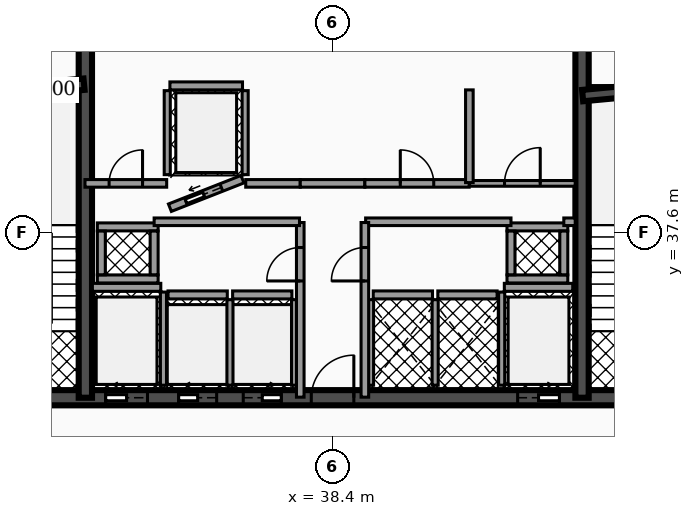
"""IFC4 building model, lengths in metres.
Left out: names, types, materials, properties, quantities, classifications, styles, units other than length and angle.
Written with IfcOpenShell. Run it as: python <this file> out.ifc"""

import sys

from ifc_helpers import new_model, si_unit, direction, frame, frame_2d, origin, place, context, subcontext, project, spatial, rectangle, extrude, element, fill, save


model = new_model("IFC4")
c1 = context("Model", 3, precision=1e-05, world=origin(), true_north=direction((0.0, 1.0)))
c2 = subcontext(c1, "Body", "Model", "MODEL_VIEW")
j1 = project(units=[si_unit("LENGTHUNIT", "METRE"), si_unit("PLANEANGLEUNIT", "RADIAN")], contexts=[c1])
p1 = place(None, origin())
s1 = spatial("IfcSite", under=j1, at=p1, CompositionType="ELEMENT")
p2 = place(p1, origin())
s2 = spatial("IfcBuilding", under=s1, at=p2, CompositionType="ELEMENT")
p3 = place(p2, frame((0.0, 0.0, 142.12)))
s3 = spatial("IfcBuildingStorey", under=s2, at=p3, CompositionType="ELEMENT", Elevation=142.12)
p4 = place(p3, frame((28.4, 33.25, 0.0), z_axis=(0.0, 0.0, 1.0), x_axis=(1.0, 0.0, 0.0)))
e1 = element("IfcWall", 1, at=p4, inside=s3, PredefinedType="SHEAR", context=c2, shape_type="SweptSolid", body=[
    extrude(rectangle(XDim=20.06, YDim=0.4, at=frame_2d((10.03, 0.0))), origin(), (0.0, 0.0, 1.0), 3.5),
])
p5 = place(p4, frame((4.03, 0.0, 0.0)))
e2 = element("IfcOpeningElement", 2, at=p5, cuts=e1, PredefinedType="OPENING", context=c2, shape_type="SweptSolid", body=[
    extrude(rectangle(XDim=1.1, YDim=2.15, at=frame_2d((0.55, 1.075))), frame((0.0, 0.21, 0.0), z_axis=(0.0, -1.0, 0.0), x_axis=(1.0, 0.0, 0.0)), (0.0, 0.0, 1.0), 0.42),
])
p6 = place(p4, frame((14.87, 0.0, 0.0)))
e3 = element("IfcOpeningElement", 3, at=p6, cuts=e1, PredefinedType="OPENING", context=c2, shape_type="SweptSolid", body=[
    extrude(rectangle(XDim=1.1, YDim=2.15, at=frame_2d((0.55, 1.075))), frame((0.0, 0.21, 0.0), z_axis=(0.0, -1.0, 0.0), x_axis=(1.0, 0.0, 0.0)), (0.0, 0.0, 1.0), 0.42),
])
p7 = place(p4, frame((5.95, 0.0, 0.0)))
e4 = element("IfcOpeningElement", 4, at=p7, cuts=e1, PredefinedType="OPENING", context=c2, shape_type="SweptSolid", body=[
    extrude(rectangle(XDim=1.0, YDim=2.1, at=frame_2d((0.5, 1.05))), frame((0.0, 0.21, 0.0), z_axis=(0.0, -1.0, 0.0), x_axis=(1.0, 0.0, 0.0)), (0.0, 0.0, 1.0), 0.42),
])
p8 = place(p4, frame((7.65, 0.0, 0.0)))
e5 = element("IfcOpeningElement", 5, at=p8, cuts=e1, PredefinedType="OPENING", context=c2, shape_type="SweptSolid", body=[
    extrude(rectangle(XDim=1.0, YDim=2.1, at=frame_2d((0.5, 1.05))), frame((0.0, 0.21, 0.0), z_axis=(0.0, -1.0, 0.0), x_axis=(1.0, 0.0, 0.0)), (0.0, 0.0, 1.0), 0.42),
])
p9 = place(p4, frame((1.31, 0.0, 0.0)))
e6 = element("IfcOpeningElement", 6, at=p9, cuts=e1, PredefinedType="OPENING", context=c2, shape_type="SweptSolid", body=[
    extrude(rectangle(XDim=1.1, YDim=2.2, at=frame_2d((0.55, 1.1))), frame((0.0, 0.21, 0.0), z_axis=(0.0, -1.0, 0.0), x_axis=(1.0, 0.0, 0.0)), (0.0, 0.0, 1.0), 0.42),
])
p10 = place(p4, frame((9.44, 0.0, 0.0)))
e7 = element("IfcOpeningElement", 7, at=p10, cuts=e1, PredefinedType="OPENING", context=c2, shape_type="SweptSolid", body=[
    extrude(rectangle(XDim=1.12, YDim=2.05, at=frame_2d((0.56, 1.025))), frame((0.0, 0.21, 0.0), z_axis=(0.0, -1.0, 0.0), x_axis=(1.0, 0.0, 0.0)), (0.0, 0.0, 1.0), 0.42),
])
p11 = place(p4, frame((17.65, 0.0, 0.0)))
e8 = element("IfcOpeningElement", 8, at=p11, cuts=e1, PredefinedType="OPENING", context=c2, shape_type="SweptSolid", body=[
    extrude(rectangle(XDim=1.1, YDim=2.2, at=frame_2d((0.55, 1.1))), frame((0.0, 0.21, 0.0), z_axis=(0.0, -1.0, 0.0), x_axis=(1.0, 0.0, 0.0)), (0.0, 0.0, 1.0), 0.42),
])
for number, where, z_axis, x_axis in (
    (9, (31.895, 33.25, 0.0), (0.0, 0.0, 1.0), (0.0, 1.0, 0.0)),
    (10, (44.965, 33.25, 0.0), (0.0, 0.0, 1.0), (0.0, 1.0, 0.0)),
):
    element("IfcWall", number, at=place(p3, frame(where, z_axis=z_axis, x_axis=x_axis)), inside=s3, PredefinedType="SHEAR", context=c2, shape_type="SweptSolid", body=[
        extrude(rectangle(XDim=10.2, YDim=0.35, at=frame_2d((5.1, 0.0))), origin(), (0.0, 0.0, 1.0), 3.5),
    ])
p12 = place(p3, frame((28.64, 41.2, 0.0), z_axis=(0.0, 0.0, 1.0), x_axis=(0.995687118776, 0.092774789157, 0.0)))
e11 = element("IfcWall", 11, at=p12, inside=s3, PredefinedType="SHEAR", context=c2, shape_type="SweptSolid", body=[
    extrude(rectangle(XDim=3.234, YDim=0.3, at=frame_2d((1.617, 0.0))), origin(), (0.0, 0.0, 1.0), 3.5),
])
p13 = place(p3, frame((44.98, 41.2, 0.0), z_axis=(0.0, 0.0, 1.0), x_axis=(0.995686468965, 0.09278176286, 0.0)))
e12 = element("IfcWall", 12, at=p13, inside=s3, PredefinedType="SHEAR", context=c2, shape_type="SweptSolid", body=[
    extrude(rectangle(XDim=3.234, YDim=0.3, at=frame_2d((1.617, 0.0))), origin(), (0.0, 0.0, 1.0), 3.5),
])
p14 = place(p3, frame((32.08, 36.155, 0.0), z_axis=(0.0, 0.0, 1.0), x_axis=(1.0, 0.0, 0.0)))
e13 = element("IfcWall", 13, at=p14, inside=s3, PredefinedType="SOLIDWALL", context=c2, shape_type="SweptSolid", body=[
    extrude(rectangle(XDim=1.8, YDim=0.21, at=frame_2d((0.9, 0.0))), origin(), (0.0, 0.0, 1.0), 2.472),
])
p15 = place(p3, frame((33.95, 33.58, 0.0), z_axis=(0.0, 0.0, 1.0), x_axis=(0.0, 1.0, 0.0)))
e14 = element("IfcWall", 14, at=p15, inside=s3, PredefinedType="SOLIDWALL", context=c2, shape_type="SweptSolid", body=[
    extrude(rectangle(XDim=2.45, YDim=0.16, at=frame_2d((1.225, 0.0))), origin(), (0.0, 0.0, 1.0), 2.472),
])
p16 = place(p3, frame((42.92, 36.155, 0.0), z_axis=(0.0, 0.0, 1.0), x_axis=(1.0, 0.0, 0.0)))
e15 = element("IfcWall", 15, at=p16, inside=s3, PredefinedType="SOLIDWALL", context=c2, shape_type="SweptSolid", body=[
    extrude(rectangle(XDim=1.8, YDim=0.21, at=frame_2d((0.9, 0.0))), origin(), (0.0, 0.0, 1.0), 2.472),
])
p17 = place(p3, frame((42.85, 33.58, 0.0), z_axis=(0.0, 0.0, 1.0), x_axis=(0.0, 1.0, 0.0)))
e16 = element("IfcWall", 16, at=p17, inside=s3, PredefinedType="SOLIDWALL", context=c2, shape_type="SweptSolid", body=[
    extrude(rectangle(XDim=2.45, YDim=0.16, at=frame_2d((1.225, 0.0))), origin(), (0.0, 0.0, 1.0), 2.472),
])
p18 = place(p3, frame((34.07, 35.955, 0.0), z_axis=(0.0, 0.0, 1.0), x_axis=(1.0, 0.0, 0.0)))
e17 = element("IfcWall", 17, at=p18, inside=s3, PredefinedType="SOLIDWALL", context=c2, shape_type="SweptSolid", body=[
    extrude(rectangle(XDim=1.56, YDim=0.21, at=frame_2d((0.78, 0.0))), origin(), (0.0, 0.0, 1.0), 2.472),
])
p19 = place(p3, frame((35.7, 33.58, 0.0), z_axis=(0.0, 0.0, 1.0), x_axis=(0.0, 1.0, 0.0)))
e18 = element("IfcWall", 18, at=p19, inside=s3, PredefinedType="SOLIDWALL", context=c2, shape_type="SweptSolid", body=[
    extrude(rectangle(XDim=2.25, YDim=0.16, at=frame_2d((1.125, 0.0))), origin(), (0.0, 0.0, 1.0), 2.472),
])
p20 = place(p3, frame((35.77, 35.955, 0.0), z_axis=(0.0, 0.0, 1.0), x_axis=(1.0, 0.0, 0.0)))
e19 = element("IfcWall", 19, at=p20, inside=s3, PredefinedType="SOLIDWALL", context=c2, shape_type="SweptSolid", body=[
    extrude(rectangle(XDim=1.56, YDim=0.21, at=frame_2d((0.78, 0.0))), origin(), (0.0, 0.0, 1.0), 2.472),
])
p21 = place(p3, frame((37.4, 33.58, 0.0), z_axis=(0.0, 0.0, 1.0), x_axis=(0.0, 1.0, 0.0)))
e20 = element("IfcWall", 20, at=p21, inside=s3, PredefinedType="SOLIDWALL", context=c2, shape_type="SweptSolid", body=[
    extrude(rectangle(XDim=2.25, YDim=0.16, at=frame_2d((1.125, 0.0))), origin(), (0.0, 0.0, 1.0), 2.472),
])
p22 = place(p3, frame((34.12, 38.25, 0.0), z_axis=(0.0, 0.0, 1.0), x_axis=(0.930804993012, 0.36551616241, 0.0)))
e21 = element("IfcWall", 21, at=p22, inside=s3, PredefinedType="SOLIDWALL", context=c2, shape_type="SweptSolid", body=[
    extrude(rectangle(XDim=2.052, YDim=0.21, at=frame_2d((1.026, 0.0))), origin(), (0.0, 0.0, 1.0), 2.472),
])
p23 = place(p22, frame((0.455, 0.0, 0.0)))
e22 = element("IfcOpeningElement", 22, at=p23, cuts=e21, PredefinedType="OPENING", context=c2, shape_type="SweptSolid", body=[
    extrude(rectangle(XDim=1.0, YDim=2.1, at=frame_2d((0.5, 1.05))), frame((0.0, 0.115, 0.0), z_axis=(0.0, -1.0, 0.0), x_axis=(1.0, 0.0, 0.0)), (0.0, 0.0, 1.0), 0.23),
])
p24 = place(p3, frame((34.12, 41.455, 0.0), z_axis=(0.0, 0.0, 1.0), x_axis=(1.0, 0.0, 0.0)))
e23 = element("IfcWall", 23, at=p24, inside=s3, PredefinedType="SOLIDWALL", context=c2, shape_type="SweptSolid", body=[
    extrude(rectangle(XDim=1.91, YDim=0.21, at=frame_2d((0.955, 0.0))), origin(), (0.0, 0.0, 1.0), 2.472),
])
for number, where, z_axis, x_axis in (
    (24, (34.05, 39.12, 0.0), (0.0, 0.0, 1.0), (0.0, 1.0, 0.0)),
    (25, (36.1, 39.12, 0.0), (0.0, 0.0, 1.0), (0.0, 1.0, 0.0)),
):
    element("IfcWall", number, at=place(p3, frame(where, z_axis=z_axis, x_axis=x_axis)), inside=s3, PredefinedType="SOLIDWALL", context=c2, shape_type="SweptSolid", body=[
        extrude(rectangle(XDim=2.21, YDim=0.16, at=frame_2d((1.105, 0.0))), origin(), (0.0, 0.0, 1.0), 2.472),
    ])
p25 = place(p3, frame((39.47, 35.955, 0.0), z_axis=(0.0, 0.0, 1.0), x_axis=(1.0, 0.0, 0.0)))
e26 = element("IfcWall", 26, at=p25, inside=s3, PredefinedType="SOLIDWALL", context=c2, shape_type="SweptSolid", body=[
    extrude(rectangle(XDim=1.56, YDim=0.21, at=frame_2d((0.78, 0.0))), origin(), (0.0, 0.0, 1.0), 2.472),
])
for number, where, z_axis, x_axis in (
    (27, (39.4, 33.58, 0.0), (0.0, 0.0, 1.0), (0.0, 1.0, 0.0)),
    (28, (41.1, 33.58, 0.0), (0.0, 0.0, 1.0), (0.0, 1.0, 0.0)),
):
    element("IfcWall", number, at=place(p3, frame(where, z_axis=z_axis, x_axis=x_axis)), inside=s3, PredefinedType="SOLIDWALL", context=c2, shape_type="SweptSolid", body=[
        extrude(rectangle(XDim=2.25, YDim=0.16, at=frame_2d((1.125, 0.0))), origin(), (0.0, 0.0, 1.0), 2.472),
    ])
p26 = place(p3, frame((41.17, 35.955, 0.0), z_axis=(0.0, 0.0, 1.0), x_axis=(1.0, 0.0, 0.0)))
e29 = element("IfcWall", 29, at=p26, inside=s3, PredefinedType="SOLIDWALL", context=c2, shape_type="SweptSolid", body=[
    extrude(rectangle(XDim=1.56, YDim=0.21, at=frame_2d((0.78, 0.0))), origin(), (0.0, 0.0, 1.0), 2.472),
])
for number, where, z_axis, x_axis in (
    (30, (32.21, 36.375, 0.0), (0.0, 0.0, 1.0), (1.0, 0.0, 0.0)),
    (31, (32.21, 37.745, 0.0), (0.0, 0.0, 1.0), (1.0, 0.0, 0.0)),
):
    element("IfcWall", number, at=place(p3, frame(where, z_axis=z_axis, x_axis=x_axis)), inside=s3, PredefinedType="SOLIDWALL", context=c2, shape_type="SweptSolid", body=[
        extrude(rectangle(XDim=1.6, YDim=0.21, at=frame_2d((0.8, 0.0))), origin(), (0.0, 0.0, 1.0), 3.5),
    ])
for number, where, z_axis, x_axis in (
    (32, (32.315, 36.485, 0.0), (0.0, 0.0, 1.0), (0.0, 1.0, 0.0)),
    (33, (33.705, 36.485, 0.0), (0.0, 0.0, 1.0), (0.0, 1.0, 0.0)),
):
    element("IfcWall", number, at=place(p3, frame(where, z_axis=z_axis, x_axis=x_axis)), inside=s3, PredefinedType="SOLIDWALL", context=c2, shape_type="SweptSolid", body=[
        extrude(rectangle(XDim=1.15, YDim=0.21, at=frame_2d((0.575, 0.0))), origin(), (0.0, 0.0, 1.0), 3.5),
    ])
for number, where, z_axis, x_axis in (
    (34, (42.99, 36.375, 0.0), (0.0, 0.0, 1.0), (1.0, 0.0, 0.0)),
    (35, (42.99, 37.745, 0.0), (0.0, 0.0, 1.0), (1.0, 0.0, 0.0)),
):
    element("IfcWall", number, at=place(p3, frame(where, z_axis=z_axis, x_axis=x_axis)), inside=s3, PredefinedType="SOLIDWALL", context=c2, shape_type="SweptSolid", body=[
        extrude(rectangle(XDim=1.6, YDim=0.21, at=frame_2d((0.8, 0.0))), origin(), (0.0, 0.0, 1.0), 3.5),
    ])
for number, where, z_axis, x_axis in (
    (36, (43.095, 36.485, 0.0), (0.0, 0.0, 1.0), (0.0, 1.0, 0.0)),
    (37, (44.485, 36.485, 0.0), (0.0, 0.0, 1.0), (0.0, 1.0, 0.0)),
):
    element("IfcWall", number, at=place(p3, frame(where, z_axis=z_axis, x_axis=x_axis)), inside=s3, PredefinedType="SOLIDWALL", context=c2, shape_type="SweptSolid", body=[
        extrude(rectangle(XDim=1.15, YDim=0.21, at=frame_2d((0.575, 0.0))), origin(), (0.0, 0.0, 1.0), 3.5),
    ])
p27 = place(p3, frame((37.55, 33.265, 0.0), z_axis=(0.0, 0.0, 1.0), x_axis=(0.0, 1.0, 0.0)))
e38 = element("IfcWall", 38, at=p27, inside=s3, PredefinedType="PARTITIONING", context=c2, shape_type="SweptSolid", body=[
    extrude(rectangle(XDim=4.595, YDim=0.2, at=frame_2d((2.298, 0.0))), origin(), (0.0, 0.0, 1.0), 2.457),
])
p28 = place(p27, frame((3.058, 0.0, 0.0)))
e39 = element("IfcOpeningElement", 39, at=p28, cuts=e38, PredefinedType="OPENING", context=c2, shape_type="SweptSolid", body=[
    extrude(rectangle(XDim=0.88, YDim=2.05, at=frame_2d((0.44, 1.025))), frame((0.0, 0.11, 0.0), z_axis=(0.0, -1.0, 0.0), x_axis=(1.0, 0.0, 0.0)), (0.0, 0.0, 1.0), 0.22),
])
p29 = place(p3, frame((33.705, 37.88, 0.0), z_axis=(0.0, 0.0, 1.0), x_axis=(1.0, 0.0, 0.0)))
e40 = element("IfcWall", 40, at=p29, inside=s3, PredefinedType="PARTITIONING", context=c2, shape_type="SweptSolid", body=[
    extrude(rectangle(XDim=3.825, YDim=0.2, at=frame_2d((1.913, 0.0))), origin(), (0.0, 0.0, 1.0), 2.457),
])
p30 = place(p3, frame((31.885, 38.89, 0.0), z_axis=(0.0, 0.0, 1.0), x_axis=(1.0, 0.0, 0.0)))
e41 = element("IfcWall", 41, at=p30, inside=s3, PredefinedType="PARTITIONING", context=c2, shape_type="SweptSolid", body=[
    extrude(rectangle(XDim=2.15, YDim=0.2, at=frame_2d((1.075, 0.0))), origin(), (0.0, 0.0, 1.0), 2.457),
])
p31 = place(p30, frame((0.635, 0.0, 0.0)))
e42 = element("IfcOpeningElement", 42, at=p31, cuts=e41, PredefinedType="OPENING", context=c2, shape_type="SweptSolid", body=[
    extrude(rectangle(XDim=0.88, YDim=2.05, at=frame_2d((0.44, 1.025))), frame((0.0, 0.11, 0.0), z_axis=(0.0, -1.0, 0.0), x_axis=(1.0, 0.0, 0.0)), (0.0, 0.0, 1.0), 0.22),
])
p32 = place(p3, frame((36.115, 38.89, 0.0), z_axis=(0.0, 0.0, 1.0), x_axis=(1.0, 0.0, 0.0)))
e43 = element("IfcWall", 43, at=p32, inside=s3, PredefinedType="PARTITIONING", context=c2, shape_type="SweptSolid", body=[
    extrude(rectangle(XDim=1.435, YDim=0.2, at=frame_2d((0.718, 0.0))), origin(), (0.0, 0.0, 1.0), 2.457),
])
p33 = place(p3, frame((37.55, 38.89, 0.0), z_axis=(0.0, 0.0, 1.0), x_axis=(1.0, 0.0, 0.0)))
e44 = element("IfcWall", 44, at=p33, inside=s3, PredefinedType="PARTITIONING", context=c2, shape_type="SweptSolid", body=[
    extrude(rectangle(XDim=1.7, YDim=0.2, at=frame_2d((0.85, 0.0))), origin(), (0.0, 0.0, 1.0), 2.457),
])
p34 = place(p3, frame((39.25, 38.89, 0.0), z_axis=(0.0, 0.0, 1.0), x_axis=(1.0, 0.0, 0.0)))
e45 = element("IfcWall", 45, at=p34, inside=s3, PredefinedType="PARTITIONING", context=c2, shape_type="SweptSolid", body=[
    extrude(rectangle(XDim=2.745, YDim=0.2, at=frame_2d((1.373, 0.0))), origin(), (0.0, 0.0, 1.0), 2.457),
])
p35 = place(p34, frame((0.933, 0.0, 0.0)))
e46 = element("IfcOpeningElement", 46, at=p35, cuts=e45, PredefinedType="OPENING", context=c2, shape_type="SweptSolid", body=[
    extrude(rectangle(XDim=0.88, YDim=2.05, at=frame_2d((0.44, 1.025))), frame((0.0, 0.11, 0.0), z_axis=(0.0, -1.0, 0.0), x_axis=(1.0, 0.0, 0.0)), (0.0, 0.0, 1.0), 0.22),
])
p36 = place(p3, frame((42.005, 38.89, 0.0), z_axis=(0.0, 0.0, 1.0), x_axis=(1.0, 0.0, 0.0)))
e47 = element("IfcWall", 47, at=p36, inside=s3, PredefinedType="PARTITIONING", context=c2, shape_type="SweptSolid", body=[
    extrude(rectangle(XDim=2.78, YDim=0.15, at=frame_2d((1.39, 0.0))), origin(), (0.0, 0.0, 1.0), 2.457),
])
p37 = place(p36, frame((0.92, 0.0, 0.0)))
e48 = element("IfcOpeningElement", 48, at=p37, cuts=e47, PredefinedType="OPENING", context=c2, shape_type="SweptSolid", body=[
    extrude(rectangle(XDim=0.94, YDim=2.05, at=frame_2d((0.47, 1.025))), frame((0.0, 0.085, 0.0), z_axis=(0.0, -1.0, 0.0), x_axis=(1.0, 0.0, 0.0)), (0.0, 0.0, 1.0), 0.17),
])
p38 = place(p3, frame((39.27, 37.88, 0.0), z_axis=(0.0, 0.0, 1.0), x_axis=(1.0, 0.0, 0.0)))
e49 = element("IfcWall", 49, at=p38, inside=s3, PredefinedType="PARTITIONING", context=c2, shape_type="SweptSolid", body=[
    extrude(rectangle(XDim=3.825, YDim=0.2, at=frame_2d((1.913, 0.0))), origin(), (0.0, 0.0, 1.0), 2.457),
])
p39 = place(p3, frame((44.485, 37.88, 0.0), z_axis=(0.0, 0.0, 1.0), x_axis=(1.0, 0.0, 0.0)))
e50 = element("IfcWall", 50, at=p39, inside=s3, PredefinedType="PARTITIONING", context=c2, shape_type="SweptSolid", body=[
    extrude(rectangle(XDim=0.3, YDim=0.2, at=frame_2d((0.15, 0.0))), origin(), (0.0, 0.0, 1.0), 2.457),
])
p40 = place(p3, frame((39.25, 33.265, 0.0), z_axis=(0.0, 0.0, 1.0), x_axis=(0.0, 1.0, 0.0)))
e51 = element("IfcWall", 51, at=p40, inside=s3, PredefinedType="PARTITIONING", context=c2, shape_type="SweptSolid", body=[
    extrude(rectangle(XDim=4.595, YDim=0.2, at=frame_2d((2.298, 0.0))), origin(), (0.0, 0.0, 1.0), 2.457),
])
p41 = place(p40, frame((3.058, 0.0, 0.0)))
e52 = element("IfcOpeningElement", 52, at=p41, cuts=e51, PredefinedType="OPENING", context=c2, shape_type="SweptSolid", body=[
    extrude(rectangle(XDim=0.88, YDim=2.05, at=frame_2d((0.44, 1.025))), frame((0.0, 0.11, 0.0), z_axis=(0.0, -1.0, 0.0), x_axis=(1.0, 0.0, 0.0)), (0.0, 0.0, 1.0), 0.22),
])
p42 = place(p3, frame((42.0, 38.91, 0.0), z_axis=(0.0, 0.0, 1.0), x_axis=(0.0, 1.0, 0.0)))
e53 = element("IfcWall", 53, at=p42, inside=s3, PredefinedType="PARTITIONING", context=c2, shape_type="SweptSolid", body=[
    extrude(rectangle(XDim=2.44, YDim=0.2, at=frame_2d((1.22, 0.0))), origin(), (0.0, 0.0, 1.0), 2.457),
])
p43 = place(p5, origin())
e54 = element("IfcDoor", 54, at=p43, inside=s3, OperationType="SLIDING_TO_LEFT", PredefinedType="DOOR", context=c2, shape_type="SweptSolid", body=[
    extrude(rectangle(XDim=1.1, YDim=2.15, at=frame_2d((0.55, 1.075))), frame((0.0, 0.025, 0.0), z_axis=(0.0, -1.0, 0.0), x_axis=(1.0, 0.0, 0.0)), (0.0, 0.0, 1.0), 0.05),
])
fill(e2, e54)
p44 = place(p6, origin())
e55 = element("IfcDoor", 55, at=p44, inside=s3, OperationType="SLIDING_TO_RIGHT", PredefinedType="DOOR", context=c2, shape_type="SweptSolid", body=[
    extrude(rectangle(XDim=1.1, YDim=2.15, at=frame_2d((0.55, 1.075))), frame((0.0, 0.025, 0.0), z_axis=(0.0, -1.0, 0.0), x_axis=(1.0, 0.0, 0.0)), (0.0, 0.0, 1.0), 0.05),
])
fill(e3, e55)
p45 = place(p7, origin())
e56 = element("IfcDoor", 56, at=p45, inside=s3, OperationType="SLIDING_TO_LEFT", PredefinedType="DOOR", context=c2, shape_type="SweptSolid", body=[
    extrude(rectangle(XDim=1.0, YDim=2.1, at=frame_2d((0.5, 1.05))), frame((0.0, 0.025, 0.0), z_axis=(0.0, -1.0, 0.0), x_axis=(1.0, 0.0, 0.0)), (0.0, 0.0, 1.0), 0.05),
])
fill(e4, e56)
p46 = place(p8, origin())
e57 = element("IfcDoor", 57, at=p46, inside=s3, OperationType="SLIDING_TO_RIGHT", PredefinedType="DOOR", context=c2, shape_type="SweptSolid", body=[
    extrude(rectangle(XDim=1.0, YDim=2.1, at=frame_2d((0.5, 1.05))), frame((0.0, 0.025, 0.0), z_axis=(0.0, -1.0, 0.0), x_axis=(1.0, 0.0, 0.0)), (0.0, 0.0, 1.0), 0.05),
])
fill(e5, e57)
p47 = place(p23, origin())
e58 = element("IfcDoor", 58, at=p47, inside=s3, OperationType="SLIDING_TO_LEFT", PredefinedType="DOOR", context=c2, shape_type="SweptSolid", body=[
    extrude(rectangle(XDim=1.0, YDim=2.1, at=frame_2d((0.5, 1.05))), frame((0.0, 0.025, 0.0), z_axis=(0.0, -1.0, 0.0), x_axis=(1.0, 0.0, 0.0)), (0.0, 0.0, 1.0), 0.05),
])
fill(e22, e58)
p48 = place(p10, origin())
e59 = element("IfcDoor", 59, at=p48, inside=s3, OperationType="SINGLE_SWING_RIGHT", PredefinedType="DOOR", context=c2, shape_type="SweptSolid", body=[
    extrude(rectangle(XDim=1.12, YDim=2.05, at=frame_2d((0.56, 1.025))), frame((0.0, 0.025, 0.0), z_axis=(0.0, -1.0, 0.0), x_axis=(1.0, 0.0, 0.0)), (0.0, 0.0, 1.0), 0.05),
])
fill(e7, e59)
p49 = place(p28, origin())
e60 = element("IfcDoor", 60, at=p49, inside=s3, OperationType="SINGLE_SWING_LEFT", PredefinedType="DOOR", context=c2, shape_type="SweptSolid", body=[
    extrude(rectangle(XDim=0.88, YDim=2.05, at=frame_2d((0.44, 1.025))), frame((0.0, 0.025, 0.0), z_axis=(0.0, -1.0, 0.0), x_axis=(1.0, 0.0, 0.0)), (0.0, 0.0, 1.0), 0.05),
])
fill(e39, e60)
p50 = place(p31, origin())
e61 = element("IfcDoor", 61, at=p50, inside=s3, OperationType="SINGLE_SWING_RIGHT", PredefinedType="DOOR", context=c2, shape_type="SweptSolid", body=[
    extrude(rectangle(XDim=0.88, YDim=2.05, at=frame_2d((0.44, 1.025))), frame((0.0, 0.025, 0.0), z_axis=(0.0, -1.0, 0.0), x_axis=(1.0, 0.0, 0.0)), (0.0, 0.0, 1.0), 0.05),
])
fill(e42, e61)
p51 = place(p35, origin())
e62 = element("IfcDoor", 62, at=p51, inside=s3, OperationType="SINGLE_SWING_LEFT", PredefinedType="DOOR", context=c2, shape_type="SweptSolid", body=[
    extrude(rectangle(XDim=0.88, YDim=2.05, at=frame_2d((0.44, 1.025))), frame((0.0, 0.025, 0.0), z_axis=(0.0, -1.0, 0.0), x_axis=(1.0, 0.0, 0.0)), (0.0, 0.0, 1.0), 0.05),
])
fill(e46, e62)
p52 = place(p37, origin())
e63 = element("IfcDoor", 63, at=p52, inside=s3, OperationType="SINGLE_SWING_RIGHT", PredefinedType="DOOR", context=c2, shape_type="SweptSolid", body=[
    extrude(rectangle(XDim=0.94, YDim=2.05, at=frame_2d((0.47, 1.025))), frame((0.0, 0.025, 0.0), z_axis=(0.0, -1.0, 0.0), x_axis=(1.0, 0.0, 0.0)), (0.0, 0.0, 1.0), 0.05),
])
fill(e48, e63)
p53 = place(p41, origin())
e64 = element("IfcDoor", 64, at=p53, inside=s3, OperationType="SINGLE_SWING_LEFT", PredefinedType="DOOR", context=c2, shape_type="SweptSolid", body=[
    extrude(rectangle(XDim=0.88, YDim=2.05, at=frame_2d((0.44, 1.025))), frame((0.0, 0.025, 0.0), z_axis=(0.0, -1.0, 0.0), x_axis=(1.0, 0.0, 0.0)), (0.0, 0.0, 1.0), 0.05),
])
fill(e52, e64)
save(model, sys.argv[1])
